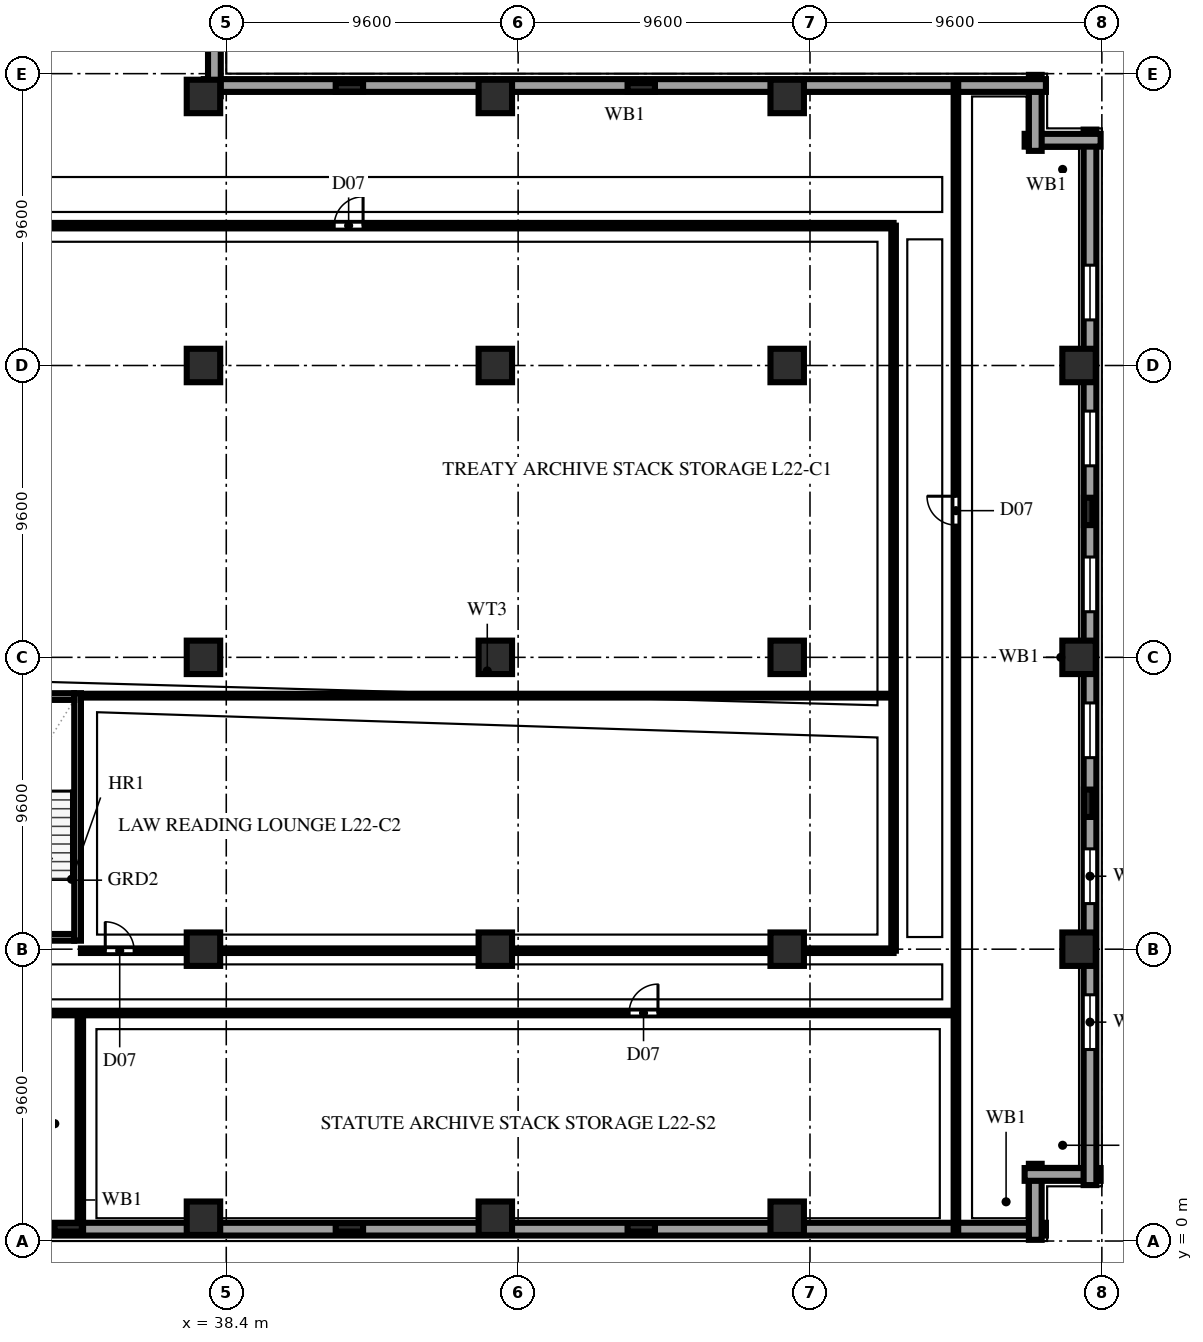
"""IFC4 building model, lengths in metres.
Left out: names, types, materials, properties, quantities, classifications, styles, units other than length and angle.
Written with IfcOpenShell. Run it as: python <this file> out.ifc"""

import sys

from ifc_helpers import new_model, si_unit, direction, frame, frame_2d, origin, origin_2d, place, context, subcontext, project, spatial, rectangle, extrude, element, fill, save


model = new_model("IFC4")
c1 = context("Model", 3, precision=1e-05, world=origin(), true_north=direction((0.0, 1.0)))
c2 = subcontext(c1, "Body", "Model", "MODEL_VIEW")
j1 = project(units=[si_unit("LENGTHUNIT", "METRE"), si_unit("PLANEANGLEUNIT", "RADIAN")], contexts=[c1])
p1 = place(None, origin())
s1 = spatial("IfcSite", under=j1, at=p1, CompositionType="ELEMENT")
p2 = place(p1, origin())
s2 = spatial("IfcBuilding", under=s1, at=p2, CompositionType="ELEMENT")
p3 = place(p2, frame((0.0, 0.0, 88.8)))
s3 = spatial("IfcBuildingStorey", under=s2, at=p3, CompositionType="ELEMENT", Elevation=88.8)
for number, where, z_axis, x_axis in (
    (1, (37.65, 0.75, 0.0), (0.0, 0.0, 1.0), (1.0, 0.0, 0.0)),
    (2, (37.65, 9.6, 0.0), (0.0, 0.0, 1.0), (1.0, 0.0, 0.0)),
    (3, (37.65, 19.2, 0.0), (0.0, 0.0, 1.0), (1.0, 0.0, 0.0)),
    (4, (37.65, 28.8, 0.0), (0.0, 0.0, 1.0), (1.0, 0.0, 0.0)),
    (5, (37.65, 37.65, 0.0), (0.0, 0.0, 1.0), (1.0, 0.0, 0.0)),
    (6, (47.25, 0.75, 0.0), (0.0, 0.0, 1.0), (1.0, 0.0, 0.0)),
    (7, (47.25, 9.6, 0.0), (0.0, 0.0, 1.0), (1.0, 0.0, 0.0)),
    (8, (47.25, 19.2, 0.0), (0.0, 0.0, 1.0), (1.0, 0.0, 0.0)),
    (9, (47.25, 28.8, 0.0), (0.0, 0.0, 1.0), (1.0, 0.0, 0.0)),
    (10, (47.25, 37.65, 0.0), (0.0, 0.0, 1.0), (1.0, 0.0, 0.0)),
    (11, (56.85, 0.75, 0.0), (0.0, 0.0, 1.0), (1.0, 0.0, 0.0)),
    (12, (56.85, 9.6, 0.0), (0.0, 0.0, 1.0), (1.0, 0.0, 0.0)),
    (13, (56.85, 19.2, 0.0), (0.0, 0.0, 1.0), (1.0, 0.0, 0.0)),
    (14, (56.85, 28.8, 0.0), (0.0, 0.0, 1.0), (1.0, 0.0, 0.0)),
    (15, (56.85, 37.65, 0.0), (0.0, 0.0, 1.0), (1.0, 0.0, 0.0)),
    (16, (66.45, 9.6, 0.0), (0.0, 0.0, 1.0), (1.0, 0.0, 0.0)),
    (17, (66.45, 19.2, 0.0), (0.0, 0.0, 1.0), (1.0, 0.0, 0.0)),
    (18, (66.45, 28.8, 0.0), (0.0, 0.0, 1.0), (1.0, 0.0, 0.0)),
):
    element("IfcColumn", number, at=place(p3, frame(where, z_axis=z_axis, x_axis=x_axis)), inside=s3, PredefinedType="COLUMN", context=c2, shape_type="SweptSolid", body=[
        extrude(rectangle(XDim=1.1, YDim=1.1, at=origin_2d()), origin(), (0.0, 0.0, 1.0), 3.8),
    ])
for number, where, z_axis, x_axis in (
    (19, (33.2, 0.45, 0.0), (0.0, 0.0, 1.0), (1.0, 0.0, 0.0)),
    (20, (42.45, 0.45, 0.0), (0.0, 0.0, 1.0), (1.0, 0.0, 0.0)),
    (21, (52.05, 0.45, 0.0), (0.0, 0.0, 1.0), (1.0, 0.0, 0.0)),
    (22, (66.75, 14.4, 0.0), (0.0, 0.0, 1.0), (0.0, 1.0, 0.0)),
    (23, (66.75, 24.0, 0.0), (0.0, 0.0, 1.0), (0.0, 1.0, 0.0)),
    (24, (42.45, 37.95, 0.0), (0.0, 0.0, 1.0), (1.0, 0.0, 0.0)),
    (25, (52.05, 37.95, 0.0), (0.0, 0.0, 1.0), (1.0, 0.0, 0.0)),
):
    element("IfcColumn", number, at=place(p3, frame(where, z_axis=z_axis, x_axis=x_axis)), inside=s3, PredefinedType="PILASTER", context=c2, shape_type="SweptSolid", body=[
        extrude(rectangle(XDim=0.9, YDim=0.28, at=origin_2d()), origin(), (0.0, 0.0, 1.0), 3.8),
    ])
p4 = place(p3, frame((1.84, 0.39, 0.0), z_axis=(0.0, 0.0, 1.0), x_axis=(1.0, 0.0, 0.0)))
e26 = element("IfcWall", 26, at=p4, inside=s3, PredefinedType="SOLIDWALL", context=c2, shape_type="SweptSolid", body=[
    extrude(rectangle(XDim=63.52, YDim=0.42, at=frame_2d((31.76, 0.0))), origin(), (0.0, 0.0, 1.0), 3.54),
])
p5 = place(p4, frame((4.16, 0.0, 0.85)))
e27 = element("IfcOpeningElement", 27, at=p5, cuts=e26, PredefinedType="OPENING", context=c2, shape_type="SweptSolid", body=[
    extrude(rectangle(XDim=2.4, YDim=1.85, at=frame_2d((1.2, 0.925))), frame((0.0, 0.222, 0.0), z_axis=(0.0, -1.0, 0.0), x_axis=(1.0, 0.0, 0.0)), (0.0, 0.0, 1.0), 0.444),
])
p6 = place(p4, frame((8.96, 0.0, 0.85)))
e28 = element("IfcOpeningElement", 28, at=p6, cuts=e26, PredefinedType="OPENING", context=c2, shape_type="SweptSolid", body=[
    extrude(rectangle(XDim=2.4, YDim=1.85, at=frame_2d((1.2, 0.925))), frame((0.0, 0.222, 0.0), z_axis=(0.0, -1.0, 0.0), x_axis=(1.0, 0.0, 0.0)), (0.0, 0.0, 1.0), 0.444),
])
p7 = place(p4, frame((13.76, 0.0, 0.85)))
e29 = element("IfcOpeningElement", 29, at=p7, cuts=e26, PredefinedType="OPENING", context=c2, shape_type="SweptSolid", body=[
    extrude(rectangle(XDim=2.4, YDim=1.85, at=frame_2d((1.2, 0.925))), frame((0.0, 0.222, 0.0), z_axis=(0.0, -1.0, 0.0), x_axis=(1.0, 0.0, 0.0)), (0.0, 0.0, 1.0), 0.444),
])
p8 = place(p4, frame((18.56, 0.0, 0.85)))
e30 = element("IfcOpeningElement", 30, at=p8, cuts=e26, PredefinedType="OPENING", context=c2, shape_type="SweptSolid", body=[
    extrude(rectangle(XDim=2.4, YDim=1.85, at=frame_2d((1.2, 0.925))), frame((0.0, 0.222, 0.0), z_axis=(0.0, -1.0, 0.0), x_axis=(1.0, 0.0, 0.0)), (0.0, 0.0, 1.0), 0.444),
])
p9 = place(p4, frame((23.36, 0.0, 0.85)))
e31 = element("IfcOpeningElement", 31, at=p9, cuts=e26, PredefinedType="OPENING", context=c2, shape_type="SweptSolid", body=[
    extrude(rectangle(XDim=2.4, YDim=1.85, at=frame_2d((1.2, 0.925))), frame((0.0, 0.222, 0.0), z_axis=(0.0, -1.0, 0.0), x_axis=(1.0, 0.0, 0.0)), (0.0, 0.0, 1.0), 0.444),
])
p10 = place(p4, frame((28.16, 0.0, 0.85)))
e32 = element("IfcOpeningElement", 32, at=p10, cuts=e26, PredefinedType="OPENING", context=c2, shape_type="SweptSolid", body=[
    extrude(rectangle(XDim=2.4, YDim=1.85, at=frame_2d((1.2, 0.925))), frame((0.0, 0.222, 0.0), z_axis=(0.0, -1.0, 0.0), x_axis=(1.0, 0.0, 0.0)), (0.0, 0.0, 1.0), 0.444),
])
for number, where, z_axis, x_axis in (
    (33, (65.01, 0.04, 0.0), (0.0, 0.0, 1.0), (0.0, 1.0, 0.0)),
    (34, (64.66, 2.19, 0.0), (0.0, 0.0, 1.0), (1.0, 0.0, 0.0)),
):
    element("IfcWall", number, at=place(p3, frame(where, z_axis=z_axis, x_axis=x_axis)), inside=s3, PredefinedType="SOLIDWALL", context=c2, shape_type="SweptSolid", body=[
        extrude(rectangle(XDim=2.5, YDim=0.42, at=frame_2d((1.25, 0.0))), origin(), (0.0, 0.0, 1.0), 3.54),
    ])
p11 = place(p3, frame((66.81, 1.84, 0.0), z_axis=(0.0, 0.0, 1.0), x_axis=(0.0, 1.0, 0.0)))
e35 = element("IfcWall", 35, at=p11, inside=s3, PredefinedType="SOLIDWALL", context=c2, shape_type="SweptSolid", body=[
    extrude(rectangle(XDim=34.72, YDim=0.42, at=frame_2d((17.36, 0.0))), origin(), (0.0, 0.0, 1.0), 3.54),
])
p12 = place(p11, frame((4.46, 0.0, 0.85)))
e36 = element("IfcOpeningElement", 36, at=p12, cuts=e35, PredefinedType="OPENING", context=c2, shape_type="SweptSolid", body=[
    extrude(rectangle(XDim=1.8, YDim=1.85, at=frame_2d((0.9, 0.925))), frame((0.0, 0.222, 0.0), z_axis=(0.0, -1.0, 0.0), x_axis=(1.0, 0.0, 0.0)), (0.0, 0.0, 1.0), 0.444),
])
p13 = place(p11, frame((9.26, 0.0, 0.85)))
e37 = element("IfcOpeningElement", 37, at=p13, cuts=e35, PredefinedType="OPENING", context=c2, shape_type="SweptSolid", body=[
    extrude(rectangle(XDim=1.8, YDim=1.85, at=frame_2d((0.9, 0.925))), frame((0.0, 0.222, 0.0), z_axis=(0.0, -1.0, 0.0), x_axis=(1.0, 0.0, 0.0)), (0.0, 0.0, 1.0), 0.444),
])
p14 = place(p11, frame((14.06, 0.0, 0.85)))
e38 = element("IfcOpeningElement", 38, at=p14, cuts=e35, PredefinedType="OPENING", context=c2, shape_type="SweptSolid", body=[
    extrude(rectangle(XDim=1.8, YDim=1.85, at=frame_2d((0.9, 0.925))), frame((0.0, 0.222, 0.0), z_axis=(0.0, -1.0, 0.0), x_axis=(1.0, 0.0, 0.0)), (0.0, 0.0, 1.0), 0.444),
])
p15 = place(p11, frame((18.86, 0.0, 0.85)))
e39 = element("IfcOpeningElement", 39, at=p15, cuts=e35, PredefinedType="OPENING", context=c2, shape_type="SweptSolid", body=[
    extrude(rectangle(XDim=1.8, YDim=1.85, at=frame_2d((0.9, 0.925))), frame((0.0, 0.222, 0.0), z_axis=(0.0, -1.0, 0.0), x_axis=(1.0, 0.0, 0.0)), (0.0, 0.0, 1.0), 0.444),
])
p16 = place(p11, frame((23.66, 0.0, 0.85)))
e40 = element("IfcOpeningElement", 40, at=p16, cuts=e35, PredefinedType="OPENING", context=c2, shape_type="SweptSolid", body=[
    extrude(rectangle(XDim=1.8, YDim=1.85, at=frame_2d((0.9, 0.925))), frame((0.0, 0.222, 0.0), z_axis=(0.0, -1.0, 0.0), x_axis=(1.0, 0.0, 0.0)), (0.0, 0.0, 1.0), 0.444),
])
p17 = place(p11, frame((28.46, 0.0, 0.85)))
e41 = element("IfcOpeningElement", 41, at=p17, cuts=e35, PredefinedType="OPENING", context=c2, shape_type="SweptSolid", body=[
    extrude(rectangle(XDim=1.8, YDim=1.85, at=frame_2d((0.9, 0.925))), frame((0.0, 0.222, 0.0), z_axis=(0.0, -1.0, 0.0), x_axis=(1.0, 0.0, 0.0)), (0.0, 0.0, 1.0), 0.444),
])
for number, where, z_axis, x_axis in (
    (42, (67.16, 36.21, 0.0), (0.0, 0.0, 1.0), (-1.0, 0.0, 0.0)),
    (43, (65.01, 35.86, 0.0), (0.0, 0.0, 1.0), (0.0, 1.0, 0.0)),
):
    element("IfcWall", number, at=place(p3, frame(where, z_axis=z_axis, x_axis=x_axis)), inside=s3, PredefinedType="SOLIDWALL", context=c2, shape_type="SweptSolid", body=[
        extrude(rectangle(XDim=2.5, YDim=0.42, at=frame_2d((1.25, 0.0))), origin(), (0.0, 0.0, 1.0), 3.54),
    ])
for number, where, z_axis, x_axis in (
    (44, (65.36, 38.01, 0.0), (0.0, 0.0, 1.0), (-1.0, 0.0, 0.0)),
    (45, (38.01, 37.66, 0.0), (0.0, 0.0, 1.0), (0.0, 1.0, 0.0)),
):
    element("IfcWall", number, at=place(p3, frame(where, z_axis=z_axis, x_axis=x_axis)), inside=s3, PredefinedType="SOLIDWALL", context=c2, shape_type="SweptSolid", body=[
        extrude(rectangle(XDim=27.7, YDim=0.42, at=frame_2d((13.85, 0.0))), origin(), (0.0, 0.0, 1.0), 3.54),
    ])
p18 = place(p3, frame((29.75, 9.99, 0.0), z_axis=(0.0, 0.0, 1.0), x_axis=(1.0, 0.0, 0.0)))
e46 = element("IfcWall", 46, at=p18, inside=s3, PredefinedType="SOLIDWALL", context=c2, shape_type="SweptSolid", body=[
    extrude(rectangle(XDim=3.65, YDim=0.22, at=frame_2d((1.825, 0.0))), origin(), (0.0, 0.0, 1.0), 3.54),
])
p19 = place(p18, frame((1.24, 0.0, 0.0)))
e47 = element("IfcOpeningElement", 47, at=p19, cuts=e46, PredefinedType="OPENING", context=c2, shape_type="SweptSolid", body=[
    extrude(rectangle(XDim=1.1, YDim=2.2, at=frame_2d((0.55, 1.1))), frame((0.0, 0.122, 0.0), z_axis=(0.0, -1.0, 0.0), x_axis=(1.0, 0.0, 0.0)), (0.0, 0.0, 1.0), 0.244),
])
p20 = place(p3, frame((33.51, 9.88, 0.0), z_axis=(0.0, 0.0, 1.0), x_axis=(0.0, 1.0, 0.0)))
e48 = element("IfcWall", 48, at=p20, inside=s3, PredefinedType="SOLIDWALL", context=c2, shape_type="SweptSolid", body=[
    extrude(rectangle(XDim=8.14, YDim=0.22, at=frame_2d((4.07, 0.0))), origin(), (0.0, 0.0, 1.0), 3.54),
])
p21 = place(p3, frame((29.75, 17.91, 0.0), z_axis=(0.0, 0.0, 1.0), x_axis=(1.0, 0.0, 0.0)))
e49 = element("IfcWall", 49, at=p21, inside=s3, PredefinedType="SOLIDWALL", context=c2, shape_type="SweptSolid", body=[
    extrude(rectangle(XDim=3.65, YDim=0.22, at=frame_2d((1.825, 0.0))), origin(), (0.0, 0.0, 1.0), 3.54),
])
p22 = place(p3, frame((33.6, 0.22, 0.0), z_axis=(0.0, 0.0, 1.0), x_axis=(0.0, 1.0, 0.0)))
e50 = element("IfcWall", 50, at=p22, inside=s3, PredefinedType="PARTITIONING", context=c2, shape_type="SweptSolid", body=[
    extrude(rectangle(XDim=7.28, YDim=0.18, at=frame_2d((3.64, 0.0))), origin(), (0.0, 0.0, 1.0), 3.54),
])
p23 = place(p3, frame((0.22, 7.5, 0.0), z_axis=(0.0, 0.0, 1.0), x_axis=(1.0, 0.0, 0.0)))
e51 = element("IfcWall", 51, at=p23, inside=s3, PredefinedType="PARTITIONING", context=c2, shape_type="SweptSolid", body=[
    extrude(rectangle(XDim=62.18, YDim=0.15, at=frame_2d((31.09, 0.0))), origin(), (0.0, 0.0, 1.0), 3.54),
])
p24 = place(p23, frame((23.18, 0.0, 0.0)))
e52 = element("IfcOpeningElement", 52, at=p24, cuts=e51, PredefinedType="OPENING", context=c2, shape_type="SweptSolid", body=[
    extrude(rectangle(XDim=0.95, YDim=2.15, at=frame_2d((0.475, 1.075))), frame((0.0, 0.087, 0.0), z_axis=(0.0, -1.0, 0.0), x_axis=(1.0, 0.0, 0.0)), (0.0, 0.0, 1.0), 0.174),
])
p25 = place(p23, frame((51.43, 0.0, 0.0)))
e53 = element("IfcOpeningElement", 53, at=p25, cuts=e51, PredefinedType="OPENING", context=c2, shape_type="SweptSolid", body=[
    extrude(rectangle(XDim=0.95, YDim=2.15, at=frame_2d((0.475, 1.075))), frame((0.0, 0.087, 0.0), z_axis=(0.0, -1.0, 0.0), x_axis=(1.0, 0.0, 0.0)), (0.0, 0.0, 1.0), 0.174),
])
p26 = place(p3, frame((62.4, 0.22, 0.0), z_axis=(0.0, 0.0, 1.0), x_axis=(0.0, 1.0, 0.0)))
e54 = element("IfcWall", 54, at=p26, inside=s3, PredefinedType="PARTITIONING", context=c2, shape_type="SweptSolid", body=[
    extrude(rectangle(XDim=37.96, YDim=0.15, at=frame_2d((18.98, 0.0))), origin(), (0.0, 0.0, 1.0), 3.54),
])
p27 = place(p26, frame((23.33, 0.0, 0.0)))
e55 = element("IfcOpeningElement", 55, at=p27, cuts=e54, PredefinedType="OPENING", context=c2, shape_type="SweptSolid", body=[
    extrude(rectangle(XDim=0.95, YDim=2.15, at=frame_2d((0.475, 1.075))), frame((0.0, 0.087, 0.0), z_axis=(0.0, -1.0, 0.0), x_axis=(1.0, 0.0, 0.0)), (0.0, 0.0, 1.0), 0.174),
])
p28 = place(p3, frame((19.28, 33.4, 0.0), z_axis=(0.0, 0.0, 1.0), x_axis=(1.0, 0.0, 0.0)))
e56 = element("IfcWall", 56, at=p28, inside=s3, PredefinedType="PARTITIONING", context=c2, shape_type="SweptSolid", body=[
    extrude(rectangle(XDim=41.07, YDim=0.18, at=frame_2d((20.535, 0.0))), origin(), (0.0, 0.0, 1.0), 3.54),
])
p29 = place(p28, frame((22.67, 0.0, 0.0)))
e57 = element("IfcOpeningElement", 57, at=p29, cuts=e56, PredefinedType="OPENING", context=c2, shape_type="SweptSolid", body=[
    extrude(rectangle(XDim=0.95, YDim=2.15, at=frame_2d((0.475, 1.075))), frame((0.0, 0.102, 0.0), z_axis=(0.0, -1.0, 0.0), x_axis=(1.0, 0.0, 0.0)), (0.0, 0.0, 1.0), 0.204),
])
p30 = place(p3, frame((33.62, 17.94, 0.0), z_axis=(0.0, 0.0, 1.0), x_axis=(1.0, 0.0, 0.0)))
e58 = element("IfcWall", 58, at=p30, inside=s3, PredefinedType="PARTITIONING", context=c2, shape_type="SweptSolid", body=[
    extrude(rectangle(XDim=26.73, YDim=0.125, at=frame_2d((13.365, 0.0))), origin(), (0.0, 0.0, 1.0), 3.54),
])
p31 = place(p3, frame((33.62, 9.55, 0.0), z_axis=(0.0, 0.0, 1.0), x_axis=(1.0, 0.0, 0.0)))
e59 = element("IfcWall", 59, at=p31, inside=s3, PredefinedType="PARTITIONING", context=c2, shape_type="SweptSolid", body=[
    extrude(rectangle(XDim=26.73, YDim=0.15, at=frame_2d((13.365, 0.0))), origin(), (0.0, 0.0, 1.0), 2.924),
])
p32 = place(p31, frame((0.8, 0.0, 0.0)))
e60 = element("IfcOpeningElement", 60, at=p32, cuts=e59, PredefinedType="OPENING", context=c2, shape_type="SweptSolid", body=[
    extrude(rectangle(XDim=0.95, YDim=2.15, at=frame_2d((0.475, 1.075))), frame((0.0, 0.087, 0.0), z_axis=(0.0, -1.0, 0.0), x_axis=(1.0, 0.0, 0.0)), (0.0, 0.0, 1.0), 0.174),
])
p33 = place(p3, frame((60.35, 9.55, 0.0), z_axis=(0.0, 0.0, 1.0), x_axis=(0.0, 1.0, 0.0)))
e61 = element("IfcWall", 61, at=p33, inside=s3, PredefinedType="PARTITIONING", context=c2, shape_type="SweptSolid", body=[
    extrude(rectangle(XDim=23.85, YDim=0.15, at=frame_2d((11.925, 0.0))), origin(), (0.0, 0.0, 1.0), 3.54),
])
p34 = place(p12, origin())
e62 = element("IfcWindow", 62, at=p34, inside=s3, PartitioningType="DOUBLE_PANEL_VERTICAL", PredefinedType="WINDOW", context=c2, shape_type="SweptSolid", body=[
    extrude(rectangle(XDim=1.8, YDim=1.85, at=frame_2d((0.9, 0.925))), frame((0.0, 0.11, 0.0), z_axis=(0.0, -1.0, 0.0), x_axis=(1.0, 0.0, 0.0)), (0.0, 0.0, 1.0), 0.06),
])
fill(e36, e62)
p35 = place(p13, origin())
e63 = element("IfcWindow", 63, at=p35, inside=s3, PartitioningType="DOUBLE_PANEL_VERTICAL", PredefinedType="WINDOW", context=c2, shape_type="SweptSolid", body=[
    extrude(rectangle(XDim=1.8, YDim=1.85, at=frame_2d((0.9, 0.925))), frame((0.0, 0.11, 0.0), z_axis=(0.0, -1.0, 0.0), x_axis=(1.0, 0.0, 0.0)), (0.0, 0.0, 1.0), 0.06),
])
fill(e37, e63)
p36 = place(p14, origin())
e64 = element("IfcWindow", 64, at=p36, inside=s3, PartitioningType="DOUBLE_PANEL_VERTICAL", PredefinedType="WINDOW", context=c2, shape_type="SweptSolid", body=[
    extrude(rectangle(XDim=1.8, YDim=1.85, at=frame_2d((0.9, 0.925))), frame((0.0, 0.11, 0.0), z_axis=(0.0, -1.0, 0.0), x_axis=(1.0, 0.0, 0.0)), (0.0, 0.0, 1.0), 0.06),
])
fill(e38, e64)
p37 = place(p15, origin())
e65 = element("IfcWindow", 65, at=p37, inside=s3, PartitioningType="DOUBLE_PANEL_VERTICAL", PredefinedType="WINDOW", context=c2, shape_type="SweptSolid", body=[
    extrude(rectangle(XDim=1.8, YDim=1.85, at=frame_2d((0.9, 0.925))), frame((0.0, 0.11, 0.0), z_axis=(0.0, -1.0, 0.0), x_axis=(1.0, 0.0, 0.0)), (0.0, 0.0, 1.0), 0.06),
])
fill(e39, e65)
p38 = place(p16, origin())
e66 = element("IfcWindow", 66, at=p38, inside=s3, PartitioningType="DOUBLE_PANEL_VERTICAL", PredefinedType="WINDOW", context=c2, shape_type="SweptSolid", body=[
    extrude(rectangle(XDim=1.8, YDim=1.85, at=frame_2d((0.9, 0.925))), frame((0.0, 0.11, 0.0), z_axis=(0.0, -1.0, 0.0), x_axis=(1.0, 0.0, 0.0)), (0.0, 0.0, 1.0), 0.06),
])
fill(e40, e66)
p39 = place(p17, origin())
e67 = element("IfcWindow", 67, at=p39, inside=s3, PartitioningType="DOUBLE_PANEL_VERTICAL", PredefinedType="WINDOW", context=c2, shape_type="SweptSolid", body=[
    extrude(rectangle(XDim=1.8, YDim=1.85, at=frame_2d((0.9, 0.925))), frame((0.0, 0.11, 0.0), z_axis=(0.0, -1.0, 0.0), x_axis=(1.0, 0.0, 0.0)), (0.0, 0.0, 1.0), 0.06),
])
fill(e41, e67)
p40 = place(p25, origin())
e68 = element("IfcDoor", 68, at=p40, inside=s3, OperationType="SINGLE_SWING_RIGHT", PredefinedType="DOOR", context=c2, shape_type="SweptSolid", body=[
    extrude(rectangle(XDim=0.95, YDim=2.15, at=frame_2d((0.475, 1.075))), frame((0.0, 0.025, 0.0), z_axis=(0.0, -1.0, 0.0), x_axis=(1.0, 0.0, 0.0)), (0.0, 0.0, 1.0), 0.05),
])
fill(e53, e68)
p41 = place(p27, origin())
e69 = element("IfcDoor", 69, at=p41, inside=s3, OperationType="SINGLE_SWING_RIGHT", PredefinedType="DOOR", context=c2, shape_type="SweptSolid", body=[
    extrude(rectangle(XDim=0.95, YDim=2.15, at=frame_2d((0.475, 1.075))), frame((0.0, 0.025, 0.0), z_axis=(0.0, -1.0, 0.0), x_axis=(1.0, 0.0, 0.0)), (0.0, 0.0, 1.0), 0.05),
])
fill(e55, e69)
p42 = place(p29, origin())
e70 = element("IfcDoor", 70, at=p42, inside=s3, OperationType="SINGLE_SWING_RIGHT", PredefinedType="DOOR", context=c2, shape_type="SweptSolid", body=[
    extrude(rectangle(XDim=0.95, YDim=2.15, at=frame_2d((0.475, 1.075))), frame((0.0, 0.025, 0.0), z_axis=(0.0, -1.0, 0.0), x_axis=(1.0, 0.0, 0.0)), (0.0, 0.0, 1.0), 0.05),
])
fill(e57, e70)
p43 = place(p32, origin())
e71 = element("IfcDoor", 71, at=p43, inside=s3, OperationType="SINGLE_SWING_LEFT", PredefinedType="DOOR", context=c2, shape_type="SweptSolid", body=[
    extrude(rectangle(XDim=0.95, YDim=2.15, at=frame_2d((0.475, 1.075))), frame((0.0, 0.025, 0.0), z_axis=(0.0, -1.0, 0.0), x_axis=(1.0, 0.0, 0.0)), (0.0, 0.0, 1.0), 0.05),
])
fill(e60, e71)
save(model, sys.argv[1])
